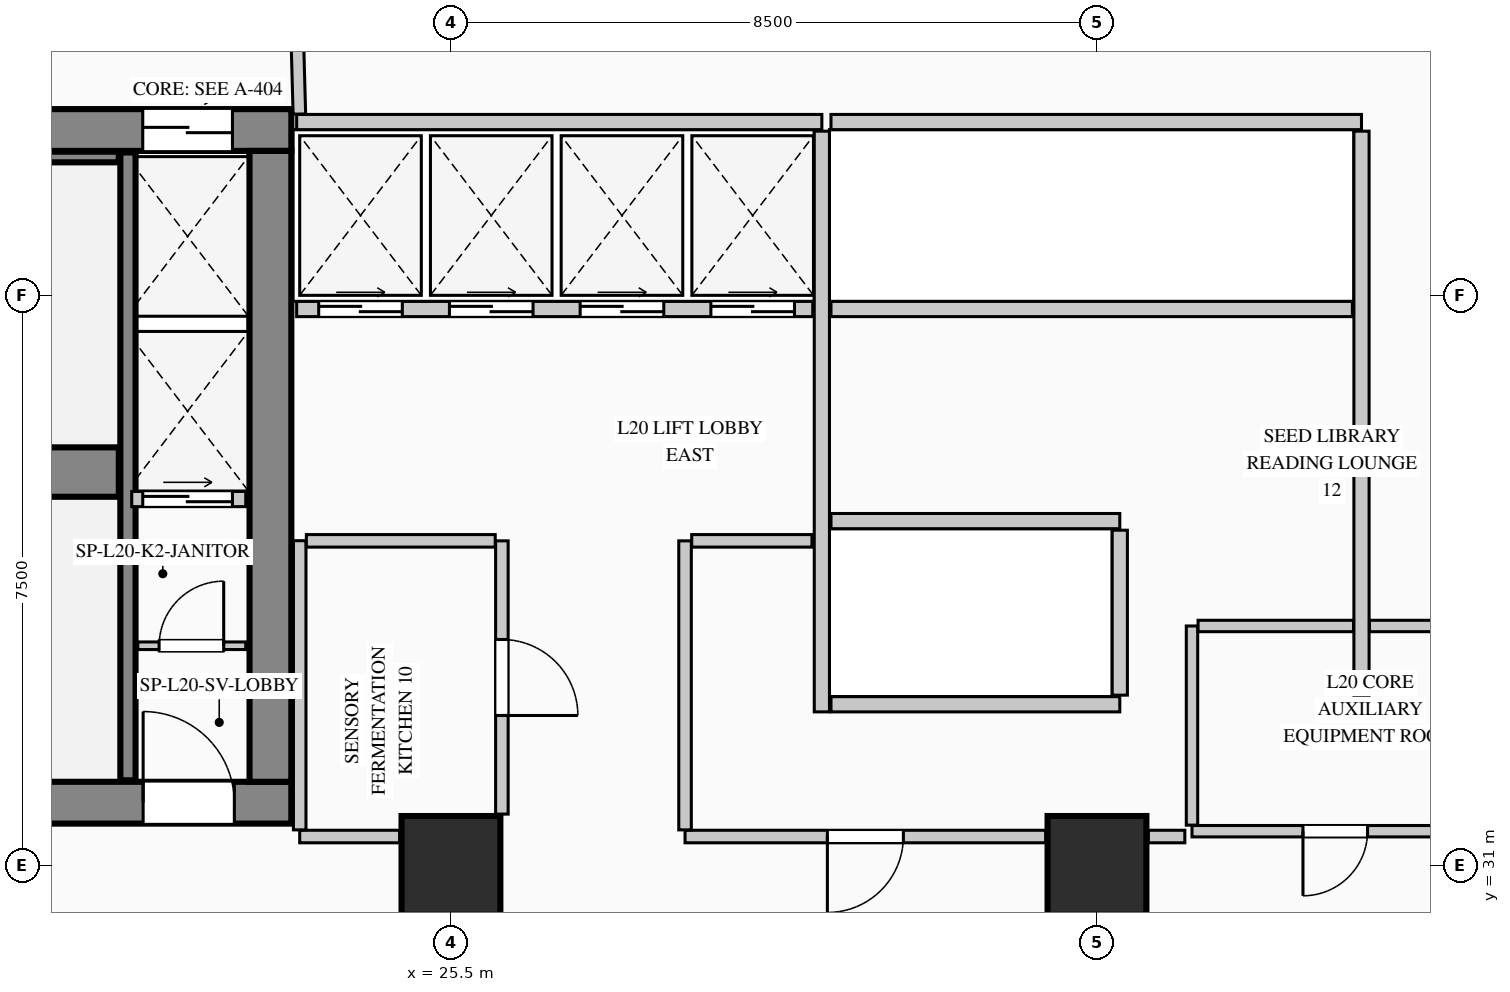
"""IFC4 building model, lengths in metres.
Left out: names, types, materials, properties, quantities, classifications, styles, units other than length and angle.
Written with IfcOpenShell. Run it as: python <this file> out.ifc"""

import sys

from ifc_helpers import new_model, si_unit, direction, frame, frame_2d, origin, origin_2d, place, context, subcontext, project, spatial, rectangle, extrude, element, fill, save


model = new_model("IFC4")
c1 = context("Model", 3, precision=1e-05, world=origin(), true_north=direction((0.0, 1.0)))
c2 = subcontext(c1, "Body", "Model", "MODEL_VIEW")
j1 = project(units=[si_unit("LENGTHUNIT", "METRE"), si_unit("PLANEANGLEUNIT", "RADIAN")], contexts=[c1])
p1 = place(None, origin())
s1 = spatial("IfcSite", under=j1, at=p1, CompositionType="ELEMENT")
p2 = place(p1, origin())
s2 = spatial("IfcBuilding", under=s1, at=p2, CompositionType="ELEMENT")
p3 = place(p2, frame((0.0, 0.0, 88.6)))
s3 = spatial("IfcBuildingStorey", under=s2, at=p3, CompositionType="ELEMENT", Elevation=88.6)
p4 = place(p3, frame((5.45, 40.675, 0.0), z_axis=(0.0, 0.0, 1.0), x_axis=(1.0, 0.0, 0.0)))
e1 = element("IfcWall", 1, at=p4, inside=s3, PredefinedType="SHEAR", context=c2, shape_type="SweptSolid", body=[
    extrude(rectangle(XDim=17.95, YDim=0.55, at=frame_2d((8.975, 0.0))), origin(), (0.0, 0.0, 1.0), 4.4),
])
p5 = place(p4, frame((15.995, 0.0, 0.0)))
e2 = element("IfcOpeningElement", 2, at=p5, cuts=e1, PredefinedType="OPENING", context=c2, shape_type="SweptSolid", body=[
    extrude(rectangle(XDim=1.18, YDim=2.25, at=frame_2d((0.59, 1.125))), frame((0.0, 0.285, 0.0), z_axis=(0.0, -1.0, 0.0), x_axis=(1.0, 0.0, 0.0)), (0.0, 0.0, 1.0), 0.57),
])
p6 = place(p3, frame((5.45, 31.825, 0.0), z_axis=(0.0, 0.0, 1.0), x_axis=(1.0, 0.0, 0.0)))
e3 = element("IfcWall", 3, at=p6, inside=s3, PredefinedType="SHEAR", context=c2, shape_type="SweptSolid", body=[
    extrude(rectangle(XDim=17.95, YDim=0.55, at=frame_2d((8.975, 0.0))), origin(), (0.0, 0.0, 1.0), 4.4),
])
p7 = place(p6, frame((3.2, 0.0, 0.0)))
e4 = element("IfcOpeningElement", 4, at=p7, cuts=e3, PredefinedType="OPENING", context=c2, shape_type="SweptSolid", body=[
    extrude(rectangle(XDim=1.2, YDim=2.2, at=frame_2d((0.6, 1.1))), frame((0.0, 0.285, 0.0), z_axis=(0.0, -1.0, 0.0), x_axis=(1.0, 0.0, 0.0)), (0.0, 0.0, 1.0), 0.57),
])
p8 = place(p6, frame((7.05, 0.0, 0.0)))
e5 = element("IfcOpeningElement", 5, at=p8, cuts=e3, PredefinedType="OPENING", context=c2, shape_type="SweptSolid", body=[
    extrude(rectangle(XDim=1.2, YDim=2.2, at=frame_2d((0.6, 1.1))), frame((0.0, 0.285, 0.0), z_axis=(0.0, -1.0, 0.0), x_axis=(1.0, 0.0, 0.0)), (0.0, 0.0, 1.0), 0.57),
])
p9 = place(p6, frame((8.9, 0.0, 0.0)))
e6 = element("IfcOpeningElement", 6, at=p9, cuts=e3, PredefinedType="OPENING", context=c2, shape_type="SweptSolid", body=[
    extrude(rectangle(XDim=1.15, YDim=2.2, at=frame_2d((0.575, 1.1))), frame((0.0, 0.285, 0.0), z_axis=(0.0, -1.0, 0.0), x_axis=(1.0, 0.0, 0.0)), (0.0, 0.0, 1.0), 0.57),
])
p10 = place(p6, frame((16.0, 0.0, 0.0)))
e7 = element("IfcOpeningElement", 7, at=p10, cuts=e3, PredefinedType="OPENING", context=c2, shape_type="SweptSolid", body=[
    extrude(rectangle(XDim=1.2, YDim=2.2, at=frame_2d((0.6, 1.1))), frame((0.0, 0.285, 0.0), z_axis=(0.0, -1.0, 0.0), x_axis=(1.0, 0.0, 0.0)), (0.0, 0.0, 1.0), 0.57),
])
p11 = place(p3, frame((23.125, 32.1, 0.0), z_axis=(0.0, 0.0, 1.0), x_axis=(0.0, 1.0, 0.0)))
e8 = element("IfcWall", 8, at=p11, inside=s3, PredefinedType="SHEAR", context=c2, shape_type="SweptSolid", body=[
    extrude(rectangle(XDim=8.3, YDim=0.55, at=frame_2d((4.15, 0.0))), origin(), (0.0, 0.0, 1.0), 4.4),
])
p12 = place(p3, frame((14.12, 36.175, 0.0), z_axis=(0.0, 0.0, 1.0), x_axis=(1.0, 0.0, 0.0)))
e9 = element("IfcWall", 9, at=p12, inside=s3, PredefinedType="SHEAR", context=c2, shape_type="SweptSolid", body=[
    extrude(rectangle(XDim=7.01, YDim=0.65, at=frame_2d((3.505, 0.0))), origin(), (0.0, 0.0, 1.0), 4.4),
])
p13 = place(p3, frame((21.25, 32.12, 0.0), z_axis=(0.0, 0.0, 1.0), x_axis=(0.0, 1.0, 0.0)))
e10 = element("IfcWall", 10, at=p13, inside=s3, PredefinedType="SHEAR", context=c2, shape_type="SweptSolid", body=[
    extrude(rectangle(XDim=8.26, YDim=0.2, at=frame_2d((4.13, 0.0))), origin(), (0.0, 0.0, 1.0), 4.4),
])
p14 = place(p3, frame((14.12, 40.32, 0.0), z_axis=(0.0, 0.0, 1.0), x_axis=(1.0, 0.0, 0.0)))
e11 = element("IfcWall", 11, at=p14, inside=s3, PredefinedType="SHEAR", context=c2, shape_type="SweptSolid", body=[
    extrude(rectangle(XDim=7.01, YDim=0.14, at=frame_2d((3.505, 0.0))), origin(), (0.0, 0.0, 1.0), 4.4),
])
for number, where, z_axis, x_axis in (
    (12, (25.5, 31.0, 0.0), (0.0, 0.0, 1.0), (1.0, 0.0, 0.0)),
    (13, (34.0, 31.0, 0.0), (0.0, 0.0, 1.0), (1.0, 0.0, 0.0)),
):
    element("IfcColumn", number, at=place(p3, frame(where, z_axis=z_axis, x_axis=x_axis)), inside=s3, PredefinedType="COLUMN", context=c2, shape_type="SweptSolid", body=[
        extrude(rectangle(XDim=1.3, YDim=1.3, at=origin_2d()), origin(), (0.0, 0.0, 1.0), 4.4),
    ])
p15 = place(p3, frame((21.38, 33.89, 0.0), z_axis=(0.0, 0.0, 1.0), x_axis=(1.0, 0.0, 0.0)))
e14 = element("IfcWall", 14, at=p15, inside=s3, PredefinedType="PARTITIONING", context=c2, shape_type="SweptSolid", body=[
    extrude(rectangle(XDim=1.42, YDim=0.1, at=frame_2d((0.71, 0.0))), origin(), (0.0, 0.0, 1.0), 4.115),
])
p16 = place(p15, frame((0.28, 0.0, 0.0)))
e15 = element("IfcOpeningElement", 15, at=p16, cuts=e14, PredefinedType="OPENING", context=c2, shape_type="SweptSolid", body=[
    extrude(rectangle(XDim=0.85, YDim=2.1, at=frame_2d((0.425, 1.05))), frame((0.0, 0.06, 0.0), z_axis=(0.0, -1.0, 0.0), x_axis=(1.0, 0.0, 0.0)), (0.0, 0.0, 1.0), 0.12),
])
p17 = place(p3, frame((21.3, 35.82, 0.0), z_axis=(0.0, 0.0, 1.0), x_axis=(1.0, 0.0, 0.0)))
e16 = element("IfcWall", 16, at=p17, inside=s3, PredefinedType="PARTITIONING", context=c2, shape_type="SweptSolid", body=[
    extrude(rectangle(XDim=1.5, YDim=0.2, at=frame_2d((0.75, 0.0))), origin(), (0.0, 0.0, 1.0), 4.115),
])
p18 = place(p17, frame((0.145, 0.0, 0.0)))
e17 = element("IfcOpeningElement", 17, at=p18, cuts=e16, PredefinedType="OPENING", context=c2, shape_type="SweptSolid", body=[
    extrude(rectangle(XDim=1.18, YDim=2.25, at=frame_2d((0.59, 1.125))), frame((0.0, 0.11, 0.0), z_axis=(0.0, -1.0, 0.0), x_axis=(1.0, 0.0, 0.0)), (0.0, 0.0, 1.0), 0.22),
])
p19 = place(p3, frame((23.47, 40.78, 0.0), z_axis=(0.0, 0.0, 1.0), x_axis=(1.0, 0.0, 0.0)))
e18 = element("IfcWall", 18, at=p19, inside=s3, PredefinedType="PARTITIONING", context=c2, shape_type="SweptSolid", body=[
    extrude(rectangle(XDim=6.91, YDim=0.2, at=frame_2d((3.455, 0.0))), origin(), (0.0, 0.0, 1.0), 4.115),
])
p20 = place(p3, frame((30.38, 33.02, 0.0), z_axis=(0.0, 0.0, 1.0), x_axis=(0.0, 1.0, 0.0)))
e19 = element("IfcWall", 19, at=p20, inside=s3, PredefinedType="PARTITIONING", context=c2, shape_type="SweptSolid", body=[
    extrude(rectangle(XDim=7.64, YDim=0.2, at=frame_2d((3.82, 0.0))), origin(), (0.0, 0.0, 1.0), 4.115),
])
p21 = place(p3, frame((23.47, 38.32, 0.0), z_axis=(0.0, 0.0, 1.0), x_axis=(1.0, 0.0, 0.0)))
e20 = element("IfcWall", 20, at=p21, inside=s3, PredefinedType="PARTITIONING", context=c2, shape_type="SweptSolid", body=[
    extrude(rectangle(XDim=6.79, YDim=0.2, at=frame_2d((3.395, 0.0))), origin(), (0.0, 0.0, 1.0), 4.115),
])
p22 = place(p21, frame((0.29, 0.0, 0.0)))
e21 = element("IfcOpeningElement", 21, at=p22, cuts=e20, PredefinedType="OPENING", context=c2, shape_type="SweptSolid", body=[
    extrude(rectangle(XDim=1.1, YDim=2.2, at=frame_2d((0.55, 1.1))), frame((0.0, 0.11, 0.0), z_axis=(0.0, -1.0, 0.0), x_axis=(1.0, 0.0, 0.0)), (0.0, 0.0, 1.0), 0.22),
])
p23 = place(p21, frame((2.01, 0.0, 0.0)))
e22 = element("IfcOpeningElement", 22, at=p23, cuts=e20, PredefinedType="OPENING", context=c2, shape_type="SweptSolid", body=[
    extrude(rectangle(XDim=1.1, YDim=2.2, at=frame_2d((0.55, 1.1))), frame((0.0, 0.11, 0.0), z_axis=(0.0, -1.0, 0.0), x_axis=(1.0, 0.0, 0.0)), (0.0, 0.0, 1.0), 0.22),
])
p24 = place(p21, frame((3.73, 0.0, 0.0)))
e23 = element("IfcOpeningElement", 23, at=p24, cuts=e20, PredefinedType="OPENING", context=c2, shape_type="SweptSolid", body=[
    extrude(rectangle(XDim=1.1, YDim=2.2, at=frame_2d((0.55, 1.1))), frame((0.0, 0.11, 0.0), z_axis=(0.0, -1.0, 0.0), x_axis=(1.0, 0.0, 0.0)), (0.0, 0.0, 1.0), 0.22),
])
p25 = place(p21, frame((5.45, 0.0, 0.0)))
e24 = element("IfcOpeningElement", 24, at=p25, cuts=e20, PredefinedType="OPENING", context=c2, shape_type="SweptSolid", body=[
    extrude(rectangle(XDim=1.1, YDim=2.2, at=frame_2d((0.55, 1.1))), frame((0.0, 0.11, 0.0), z_axis=(0.0, -1.0, 0.0), x_axis=(1.0, 0.0, 0.0)), (0.0, 0.0, 1.0), 0.22),
])
p26 = place(p3, frame((30.5, 40.78, 0.0), z_axis=(0.0, 0.0, 1.0), x_axis=(1.0, 0.0, 0.0)))
e25 = element("IfcWall", 25, at=p26, inside=s3, PredefinedType="PARTITIONING", context=c2, shape_type="SweptSolid", body=[
    extrude(rectangle(XDim=6.98, YDim=0.2, at=frame_2d((3.49, 0.0))), origin(), (0.0, 0.0, 1.0), 4.115),
])
p27 = place(p3, frame((37.48, 33.24, 0.0), z_axis=(0.0, 0.0, 1.0), x_axis=(0.0, 1.0, 0.0)))
e26 = element("IfcWall", 26, at=p27, inside=s3, PredefinedType="PARTITIONING", context=c2, shape_type="SweptSolid", body=[
    extrude(rectangle(XDim=7.42, YDim=0.2, at=frame_2d((3.71, 0.0))), origin(), (0.0, 0.0, 1.0), 4.115),
])
p28 = place(p3, frame((30.5, 38.32, 0.0), z_axis=(0.0, 0.0, 1.0), x_axis=(1.0, 0.0, 0.0)))
e27 = element("IfcWall", 27, at=p28, inside=s3, PredefinedType="PARTITIONING", context=c2, shape_type="SweptSolid", body=[
    extrude(rectangle(XDim=6.86, YDim=0.2, at=frame_2d((3.43, 0.0))), origin(), (0.0, 0.0, 1.0), 4.115),
])
for number, where, z_axis, x_axis in (
    (28, (30.5, 35.53, 0.0), (0.0, 0.0, 1.0), (1.0, 0.0, 0.0)),
    (29, (30.5, 33.12, 0.0), (0.0, 0.0, 1.0), (1.0, 0.0, 0.0)),
):
    element("IfcWall", number, at=place(p3, frame(where, z_axis=z_axis, x_axis=x_axis)), inside=s3, PredefinedType="PARTITIONING", context=c2, shape_type="SweptSolid", body=[
        extrude(rectangle(XDim=3.8, YDim=0.2, at=frame_2d((1.9, 0.0))), origin(), (0.0, 0.0, 1.0), 4.115),
    ])
p29 = place(p3, frame((34.3, 33.24, 0.0), z_axis=(0.0, 0.0, 1.0), x_axis=(0.0, 1.0, 0.0)))
e30 = element("IfcWall", 30, at=p29, inside=s3, PredefinedType="PARTITIONING", context=c2, shape_type="SweptSolid", body=[
    extrude(rectangle(XDim=2.17, YDim=0.2, at=frame_2d((1.085, 0.0))), origin(), (0.0, 0.0, 1.0), 4.115),
])
p30 = place(p3, frame((39.02, 31.45, 0.0), z_axis=(0.0, 0.0, 1.0), x_axis=(-1.0, 0.0, 0.0)))
e31 = element("IfcWall", 31, at=p30, inside=s3, PredefinedType="PARTITIONING", context=c2, shape_type="SweptSolid", body=[
    extrude(rectangle(XDim=3.77, YDim=0.15, at=frame_2d((1.885, 0.0))), origin(), (0.0, 0.0, 1.0), 4.115),
])
p31 = place(p30, frame((1.46, 0.0, 0.0)))
e32 = element("IfcOpeningElement", 32, at=p31, cuts=e31, PredefinedType="OPENING", context=c2, shape_type="SweptSolid", body=[
    extrude(rectangle(XDim=0.85, YDim=2.1, at=frame_2d((0.425, 1.05))), frame((0.0, 0.085, 0.0), z_axis=(0.0, -1.0, 0.0), x_axis=(1.0, 0.0, 0.0)), (0.0, 0.0, 1.0), 0.17),
])
p32 = place(p3, frame((35.25, 31.53, 0.0), z_axis=(0.0, 0.0, 1.0), x_axis=(0.0, 1.0, 0.0)))
e33 = element("IfcWall", 33, at=p32, inside=s3, PredefinedType="PARTITIONING", context=c2, shape_type="SweptSolid", body=[
    extrude(rectangle(XDim=2.62, YDim=0.15, at=frame_2d((1.31, 0.0))), origin(), (0.0, 0.0, 1.0), 4.115),
])
p33 = place(p3, frame((37.585, 34.15, 0.0), z_axis=(0.0, 0.0, 1.0), x_axis=(1.0, 0.0, 0.0)))
e34 = element("IfcWall", 34, at=p33, inside=s3, PredefinedType="PARTITIONING", context=c2, shape_type="SweptSolid", body=[
    extrude(rectangle(XDim=1.435, YDim=0.15, at=frame_2d((0.718, 0.0))), origin(), (0.0, 0.0, 1.0), 4.115),
])
p34 = place(p3, frame((35.33, 34.15, 0.0), z_axis=(0.0, 0.0, 1.0), x_axis=(1.0, 0.0, 0.0)))
e35 = element("IfcWall", 35, at=p34, inside=s3, PredefinedType="PARTITIONING", context=c2, shape_type="SweptSolid", body=[
    extrude(rectangle(XDim=2.045, YDim=0.15, at=frame_2d((1.022, 0.0))), origin(), (0.0, 0.0, 1.0), 4.115),
])
p35 = place(p3, frame((26.17, 35.27, 0.0), z_axis=(0.0, 0.0, 1.0), x_axis=(0.0, -1.0, 0.0)))
e36 = element("IfcWall", 36, at=p35, inside=s3, PredefinedType="PARTITIONING", context=c2, shape_type="SweptSolid", body=[
    extrude(rectangle(XDim=3.595, YDim=0.165, at=frame_2d((1.797, 0.0))), origin(), (0.0, 0.0, 1.0), 4.115),
])
p36 = place(p35, frame((1.298, 0.0, 0.0)))
e37 = element("IfcOpeningElement", 37, at=p36, cuts=e36, PredefinedType="OPENING", context=c2, shape_type="SweptSolid", body=[
    extrude(rectangle(XDim=1.0, YDim=2.15, at=frame_2d((0.5, 1.075))), frame((0.0, 0.093, 0.0), z_axis=(0.0, -1.0, 0.0), x_axis=(1.0, 0.0, 0.0)), (0.0, 0.0, 1.0), 0.185),
])
p37 = place(p3, frame((24.825, 31.38, 0.0), z_axis=(0.0, 0.0, 1.0), x_axis=(-1.0, 0.0, 0.0)))
e38 = element("IfcWall", 38, at=p37, inside=s3, PredefinedType="PARTITIONING", context=c2, shape_type="SweptSolid", body=[
    extrude(rectangle(XDim=1.315, YDim=0.165, at=frame_2d((0.657, 0.0))), origin(), (0.0, 0.0, 1.0), 4.115),
])
p38 = place(p3, frame((23.51, 31.468, 0.0), z_axis=(0.0, 0.0, 1.0), x_axis=(0.0, 1.0, 0.0)))
e39 = element("IfcWall", 39, at=p38, inside=s3, PredefinedType="PARTITIONING", context=c2, shape_type="SweptSolid", body=[
    extrude(rectangle(XDim=3.804, YDim=0.165, at=frame_2d((1.902, 0.0))), origin(), (0.0, 0.0, 1.0), 4.115),
])
p39 = place(p3, frame((23.597, 35.27, 0.0), z_axis=(0.0, 0.0, 1.0), x_axis=(1.0, 0.0, 0.0)))
e40 = element("IfcWall", 40, at=p39, inside=s3, PredefinedType="PARTITIONING", context=c2, shape_type="SweptSolid", body=[
    extrude(rectangle(XDim=2.485, YDim=0.165, at=frame_2d((1.243, 0.0))), origin(), (0.0, 0.0, 1.0), 4.115),
])
p40 = place(p3, frame((35.156, 31.38, 0.0), z_axis=(0.0, 0.0, 1.0), x_axis=(-1.0, 0.0, 0.0)))
e41 = element("IfcWall", 41, at=p40, inside=s3, PredefinedType="PARTITIONING", context=c2, shape_type="SweptSolid", body=[
    extrude(rectangle(XDim=0.48, YDim=0.165, at=frame_2d((0.24, 0.0))), origin(), (0.0, 0.0, 1.0), 4.115),
])
p41 = place(p3, frame((33.325, 31.38, 0.0), z_axis=(0.0, 0.0, 1.0), x_axis=(-1.0, 0.0, 0.0)))
e42 = element("IfcWall", 42, at=p41, inside=s3, PredefinedType="PARTITIONING", context=c2, shape_type="SweptSolid", body=[
    extrude(rectangle(XDim=4.745, YDim=0.165, at=frame_2d((2.373, 0.0))), origin(), (0.0, 0.0, 1.0), 4.115),
])
p42 = place(p41, frame((1.873, 0.0, 0.0)))
e43 = element("IfcOpeningElement", 43, at=p42, cuts=e42, PredefinedType="OPENING", context=c2, shape_type="SweptSolid", body=[
    extrude(rectangle(XDim=1.0, YDim=2.15, at=frame_2d((0.5, 1.075))), frame((0.0, 0.093, 0.0), z_axis=(0.0, -1.0, 0.0), x_axis=(1.0, 0.0, 0.0)), (0.0, 0.0, 1.0), 0.185),
])
p43 = place(p3, frame((28.58, 31.468, 0.0), z_axis=(0.0, 0.0, 1.0), x_axis=(0.0, 1.0, 0.0)))
e44 = element("IfcWall", 44, at=p43, inside=s3, PredefinedType="PARTITIONING", context=c2, shape_type="SweptSolid", body=[
    extrude(rectangle(XDim=3.802, YDim=0.165, at=frame_2d((1.901, 0.0))), origin(), (0.0, 0.0, 1.0), 4.115),
])
p44 = place(p3, frame((28.667, 35.27, 0.0), z_axis=(0.0, 0.0, 1.0), x_axis=(1.0, 0.0, 0.0)))
e45 = element("IfcWall", 45, at=p44, inside=s3, PredefinedType="PARTITIONING", context=c2, shape_type="SweptSolid", body=[
    extrude(rectangle(XDim=1.583, YDim=0.165, at=frame_2d((0.791, 0.0))), origin(), (0.0, 0.0, 1.0), 4.115),
])
p45 = place(p3, frame((23.506, 40.885, 0.0), z_axis=(0.0, 0.0, 1.0), x_axis=(-0.027441464163, 0.999623412113, 0.0)))
e46 = element("IfcWall", 46, at=p45, inside=s3, PredefinedType="PARTITIONING", context=c2, shape_type="SweptSolid", body=[
    extrude(rectangle(XDim=2.331, YDim=0.165, at=frame_2d((1.166, 0.0))), origin(), (0.0, 0.0, 1.0), 4.115),
])
p46 = place(p10, origin())
e47 = element("IfcDoor", 47, at=p46, inside=s3, OperationType="SINGLE_SWING_LEFT", PredefinedType="DOOR", context=c2, shape_type="SweptSolid", body=[
    extrude(rectangle(XDim=1.2, YDim=2.2, at=frame_2d((0.6, 1.1))), frame((0.0, 0.025, 0.0), z_axis=(0.0, -1.0, 0.0), x_axis=(1.0, 0.0, 0.0)), (0.0, 0.0, 1.0), 0.05),
])
fill(e7, e47)
p47 = place(p16, origin())
e48 = element("IfcDoor", 48, at=p47, inside=s3, OperationType="SINGLE_SWING_RIGHT", PredefinedType="DOOR", context=c2, shape_type="SweptSolid", body=[
    extrude(rectangle(XDim=0.85, YDim=2.1, at=frame_2d((0.425, 1.05))), frame((0.0, 0.025, 0.0), z_axis=(0.0, -1.0, 0.0), x_axis=(1.0, 0.0, 0.0)), (0.0, 0.0, 1.0), 0.05),
])
fill(e15, e48)
p48 = place(p5, origin())
e49 = element("IfcDoor", 49, at=p48, inside=s3, OperationType="DOUBLE_DOOR_SLIDING", PredefinedType="DOOR", context=c2, shape_type="SweptSolid", body=[
    extrude(rectangle(XDim=1.18, YDim=2.25, at=frame_2d((0.59, 1.125))), frame((0.0, 0.025, 0.0), z_axis=(0.0, -1.0, 0.0), x_axis=(1.0, 0.0, 0.0)), (0.0, 0.0, 1.0), 0.05),
])
fill(e2, e49)
p49 = place(p18, origin())
e50 = element("IfcDoor", 50, at=p49, inside=s3, OperationType="DOUBLE_DOOR_SLIDING", PredefinedType="DOOR", context=c2, shape_type="SweptSolid", body=[
    extrude(rectangle(XDim=1.18, YDim=2.25, at=frame_2d((0.59, 1.125))), frame((0.0, 0.025, 0.0), z_axis=(0.0, -1.0, 0.0), x_axis=(1.0, 0.0, 0.0)), (0.0, 0.0, 1.0), 0.05),
])
fill(e17, e50)
p50 = place(p22, origin())
e51 = element("IfcDoor", 51, at=p50, inside=s3, OperationType="DOUBLE_DOOR_SLIDING", PredefinedType="DOOR", context=c2, shape_type="SweptSolid", body=[
    extrude(rectangle(XDim=1.1, YDim=2.2, at=frame_2d((0.55, 1.1))), frame((0.0, 0.025, 0.0), z_axis=(0.0, -1.0, 0.0), x_axis=(1.0, 0.0, 0.0)), (0.0, 0.0, 1.0), 0.05),
])
fill(e21, e51)
p51 = place(p23, origin())
e52 = element("IfcDoor", 52, at=p51, inside=s3, OperationType="DOUBLE_DOOR_SLIDING", PredefinedType="DOOR", context=c2, shape_type="SweptSolid", body=[
    extrude(rectangle(XDim=1.1, YDim=2.2, at=frame_2d((0.55, 1.1))), frame((0.0, 0.025, 0.0), z_axis=(0.0, -1.0, 0.0), x_axis=(1.0, 0.0, 0.0)), (0.0, 0.0, 1.0), 0.05),
])
fill(e22, e52)
p52 = place(p24, origin())
e53 = element("IfcDoor", 53, at=p52, inside=s3, OperationType="DOUBLE_DOOR_SLIDING", PredefinedType="DOOR", context=c2, shape_type="SweptSolid", body=[
    extrude(rectangle(XDim=1.1, YDim=2.2, at=frame_2d((0.55, 1.1))), frame((0.0, 0.025, 0.0), z_axis=(0.0, -1.0, 0.0), x_axis=(1.0, 0.0, 0.0)), (0.0, 0.0, 1.0), 0.05),
])
fill(e23, e53)
p53 = place(p25, origin())
e54 = element("IfcDoor", 54, at=p53, inside=s3, OperationType="DOUBLE_DOOR_SLIDING", PredefinedType="DOOR", context=c2, shape_type="SweptSolid", body=[
    extrude(rectangle(XDim=1.1, YDim=2.2, at=frame_2d((0.55, 1.1))), frame((0.0, 0.025, 0.0), z_axis=(0.0, -1.0, 0.0), x_axis=(1.0, 0.0, 0.0)), (0.0, 0.0, 1.0), 0.05),
])
fill(e24, e54)
p54 = place(p31, origin())
e55 = element("IfcDoor", 55, at=p54, inside=s3, OperationType="SINGLE_SWING_RIGHT", PredefinedType="DOOR", context=c2, shape_type="SweptSolid", body=[
    extrude(rectangle(XDim=0.85, YDim=2.1, at=frame_2d((0.425, 1.05))), frame((0.0, 0.025, 0.0), z_axis=(0.0, -1.0, 0.0), x_axis=(1.0, 0.0, 0.0)), (0.0, 0.0, 1.0), 0.05),
])
fill(e32, e55)
p55 = place(p36, origin())
e56 = element("IfcDoor", 56, at=p55, inside=s3, OperationType="SINGLE_SWING_RIGHT", PredefinedType="DOOR", context=c2, shape_type="SweptSolid", body=[
    extrude(rectangle(XDim=1.0, YDim=2.15, at=frame_2d((0.5, 1.075))), frame((0.0, 0.025, 0.0), z_axis=(0.0, -1.0, 0.0), x_axis=(1.0, 0.0, 0.0)), (0.0, 0.0, 1.0), 0.05),
])
fill(e37, e56)
p56 = place(p42, origin())
e57 = element("IfcDoor", 57, at=p56, inside=s3, OperationType="SINGLE_SWING_RIGHT", PredefinedType="DOOR", context=c2, shape_type="SweptSolid", body=[
    extrude(rectangle(XDim=1.0, YDim=2.15, at=frame_2d((0.5, 1.075))), frame((0.0, 0.025, 0.0), z_axis=(0.0, -1.0, 0.0), x_axis=(1.0, 0.0, 0.0)), (0.0, 0.0, 1.0), 0.05),
])
fill(e43, e57)
save(model, sys.argv[1])
